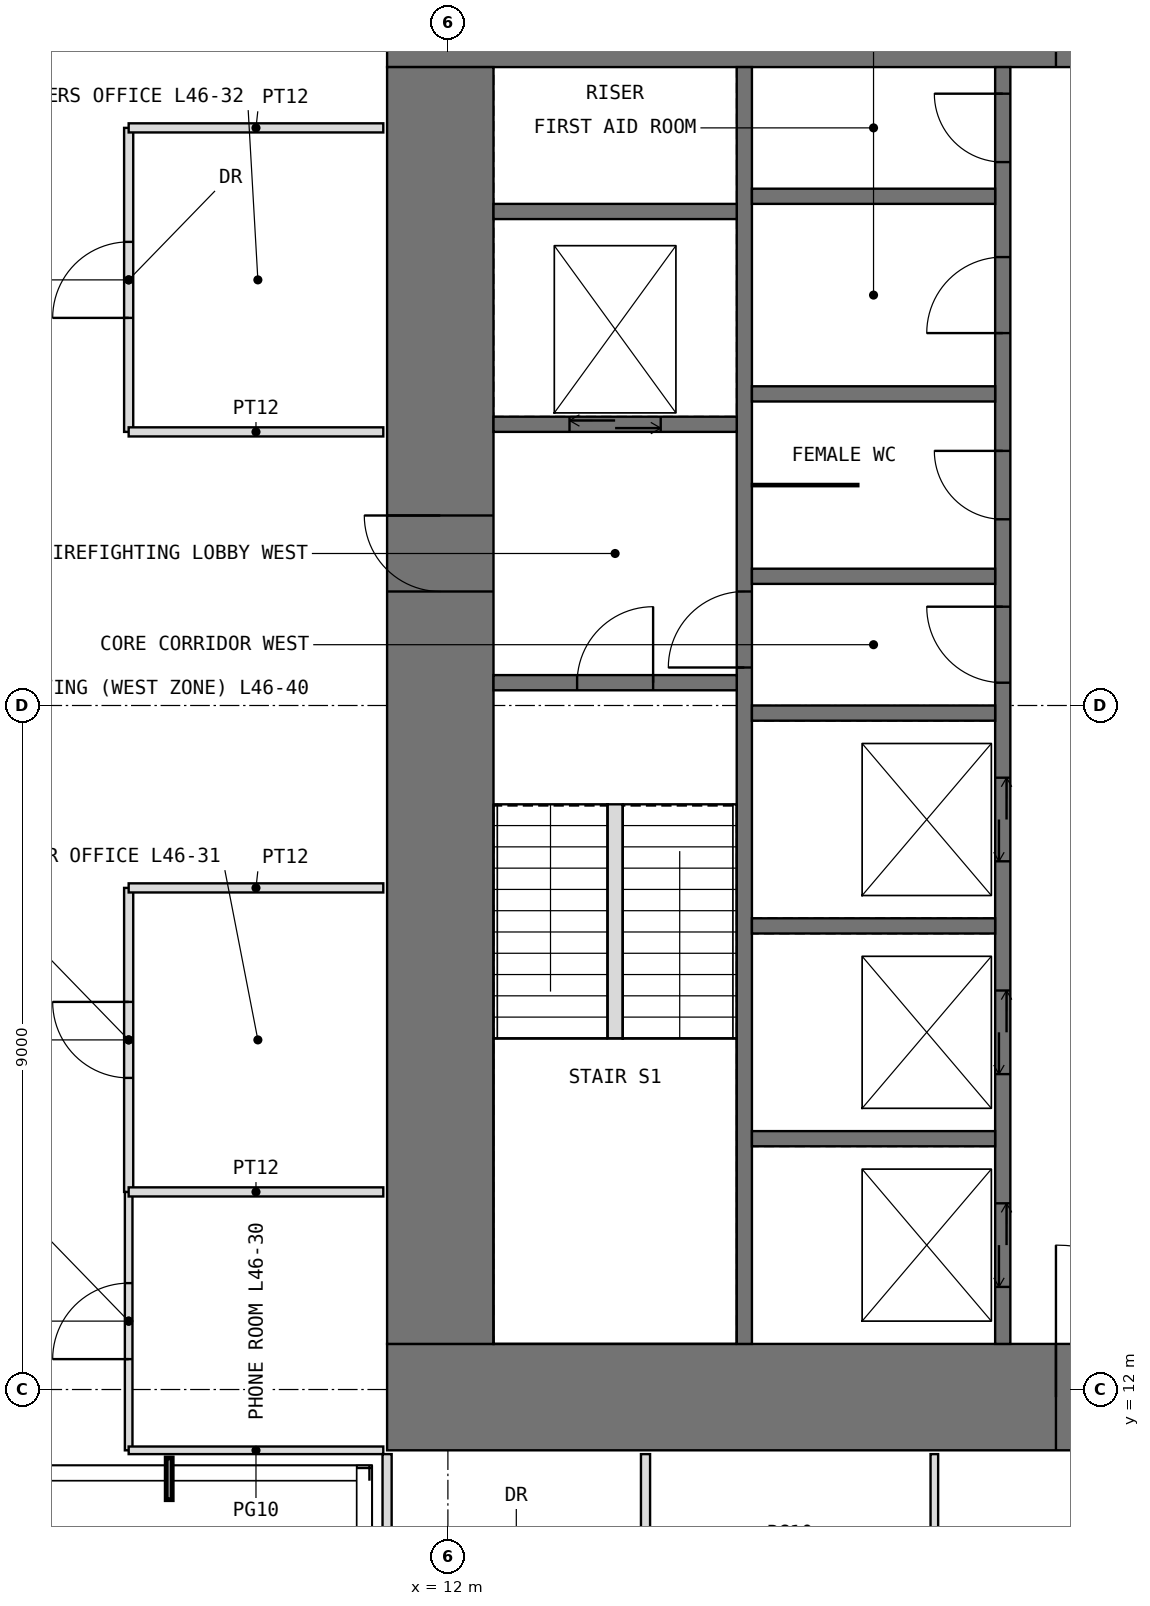
"""IFC4 building model, lengths in metres.
Left out: names, types, materials, properties, quantities, classifications, styles, units other than length and angle.
Written with IfcOpenShell. Run it as: python <this file> out.ifc"""

import sys

from ifc_helpers import new_model, si_unit, direction, frame, frame_2d, origin, place, context, subcontext, project, spatial, rectangle, extrude, element, fill, save


model = new_model("IFC4")
c1 = context("Model", 3, precision=1e-05, world=origin(), true_north=direction((0.0, 1.0)))
c2 = subcontext(c1, "Body", "Model", "MODEL_VIEW")
j1 = project(units=[si_unit("LENGTHUNIT", "METRE"), si_unit("PLANEANGLEUNIT", "RADIAN")], contexts=[c1])
p1 = place(None, origin())
s1 = spatial("IfcSite", under=j1, at=p1, CompositionType="ELEMENT")
p2 = place(p1, origin())
s2 = spatial("IfcBuilding", under=s1, at=p2, CompositionType="ELEMENT")
p3 = place(p2, frame((0.0, 0.0, 194.5)))
s3 = spatial("IfcBuildingStorey", under=s2, at=p3, CompositionType="ELEMENT", Elevation=194.5)
p4 = place(p3, frame((11.2, 11.9, -0.05), z_axis=(0.0, 0.0, 1.0), x_axis=(1.0, 0.0, 0.0)))
e1 = element("IfcWall", 1, at=p4, inside=s3, PredefinedType="SHEAR", context=c2, shape_type="SweptSolid", body=[
    extrude(rectangle(XDim=19.6, YDim=1.4, at=frame_2d((9.8, 0.0))), origin(), (0.0, 0.0, 1.0), 4.0),
])
p5 = place(p4, frame((8.8, 0.0, 0.05)))
e2 = element("IfcOpeningElement", 2, at=p5, cuts=e1, PredefinedType="OPENING", context=c2, shape_type="SweptSolid", body=[
    extrude(rectangle(XDim=2.0, YDim=2.2, at=frame_2d((1.0, 1.1))), frame((0.0, 0.71, 0.0), z_axis=(0.0, -1.0, 0.0), x_axis=(1.0, 0.0, 0.0)), (0.0, 0.0, 1.0), 1.42),
])
p6 = place(p3, frame((11.2, 30.1, -0.05), z_axis=(0.0, 0.0, 1.0), x_axis=(1.0, 0.0, 0.0)))
e3 = element("IfcWall", 3, at=p6, inside=s3, PredefinedType="SHEAR", context=c2, shape_type="SweptSolid", body=[
    extrude(rectangle(XDim=19.6, YDim=1.4, at=frame_2d((9.8, 0.0))), origin(), (0.0, 0.0, 1.0), 4.0),
])
p7 = place(p6, frame((8.8, 0.0, 0.05)))
e4 = element("IfcOpeningElement", 4, at=p7, cuts=e3, PredefinedType="OPENING", context=c2, shape_type="SweptSolid", body=[
    extrude(rectangle(XDim=2.0, YDim=2.2, at=frame_2d((1.0, 1.1))), frame((0.0, 0.71, 0.0), z_axis=(0.0, -1.0, 0.0), x_axis=(1.0, 0.0, 0.0)), (0.0, 0.0, 1.0), 1.42),
])
p8 = place(p3, frame((11.9, 12.6, -0.05), z_axis=(0.0, 0.0, 1.0), x_axis=(0.0, 1.0, 0.0)))
e5 = element("IfcWall", 5, at=p8, inside=s3, PredefinedType="SHEAR", context=c2, shape_type="SweptSolid", body=[
    extrude(rectangle(XDim=16.8, YDim=1.4, at=frame_2d((8.4, 0.0))), origin(), (0.0, 0.0, 1.0), 4.0),
])
p9 = place(p8, frame((9.9, 0.0, 0.05)))
e6 = element("IfcOpeningElement", 6, at=p9, cuts=e5, PredefinedType="OPENING", context=c2, shape_type="SweptSolid", body=[
    extrude(rectangle(XDim=1.0, YDim=2.2, at=frame_2d((0.5, 1.1))), frame((0.0, 0.71, 0.0), z_axis=(0.0, -1.0, 0.0), x_axis=(1.0, 0.0, 0.0)), (0.0, 0.0, 1.0), 1.42),
])
p10 = place(p3, frame((15.9, 12.6, -0.05), z_axis=(0.0, 0.0, 1.0), x_axis=(0.0, 1.0, 0.0)))
e7 = element("IfcWall", 7, at=p10, inside=s3, PredefinedType="SHEAR", context=c2, shape_type="SweptSolid", body=[
    extrude(rectangle(XDim=16.8, YDim=0.2, at=frame_2d((8.4, 0.0))), origin(), (0.0, 0.0, 1.0), 4.0),
])
p11 = place(p10, frame((8.9, 0.0, 0.05)))
e8 = element("IfcOpeningElement", 8, at=p11, cuts=e7, PredefinedType="OPENING", context=c2, shape_type="SweptSolid", body=[
    extrude(rectangle(XDim=1.0, YDim=2.2, at=frame_2d((0.5, 1.1))), frame((0.0, 0.11, 0.0), z_axis=(0.0, -1.0, 0.0), x_axis=(1.0, 0.0, 0.0)), (0.0, 0.0, 1.0), 0.22),
])
p12 = place(p3, frame((19.3, 12.6, -0.05), z_axis=(0.0, 0.0, 1.0), x_axis=(0.0, 1.0, 0.0)))
e9 = element("IfcWall", 9, at=p12, inside=s3, PredefinedType="SHEAR", context=c2, shape_type="SweptSolid", body=[
    extrude(rectangle(XDim=16.8, YDim=0.2, at=frame_2d((8.4, 0.0))), origin(), (0.0, 0.0, 1.0), 4.0),
])
p13 = place(p12, frame((8.7, 0.0, 0.05)))
e10 = element("IfcOpeningElement", 10, at=p13, cuts=e9, PredefinedType="OPENING", context=c2, shape_type="SweptSolid", body=[
    extrude(rectangle(XDim=1.0, YDim=2.2, at=frame_2d((0.5, 1.1))), frame((0.0, 0.11, 0.0), z_axis=(0.0, -1.0, 0.0), x_axis=(1.0, 0.0, 0.0)), (0.0, 0.0, 1.0), 0.22),
])
p14 = place(p12, frame((10.85, 0.0, 0.05)))
e11 = element("IfcOpeningElement", 11, at=p14, cuts=e9, PredefinedType="OPENING", context=c2, shape_type="SweptSolid", body=[
    extrude(rectangle(XDim=0.9, YDim=2.2, at=frame_2d((0.45, 1.1))), frame((0.0, 0.11, 0.0), z_axis=(0.0, -1.0, 0.0), x_axis=(1.0, 0.0, 0.0)), (0.0, 0.0, 1.0), 0.22),
])
p15 = place(p12, frame((13.3, 0.0, 0.05)))
e12 = element("IfcOpeningElement", 12, at=p15, cuts=e9, PredefinedType="OPENING", context=c2, shape_type="SweptSolid", body=[
    extrude(rectangle(XDim=1.0, YDim=2.2, at=frame_2d((0.5, 1.1))), frame((0.0, 0.11, 0.0), z_axis=(0.0, -1.0, 0.0), x_axis=(1.0, 0.0, 0.0)), (0.0, 0.0, 1.0), 0.22),
])
p16 = place(p12, frame((15.55, 0.0, 0.05)))
e13 = element("IfcOpeningElement", 13, at=p16, cuts=e9, PredefinedType="OPENING", context=c2, shape_type="SweptSolid", body=[
    extrude(rectangle(XDim=0.9, YDim=2.2, at=frame_2d((0.45, 1.1))), frame((0.0, 0.11, 0.0), z_axis=(0.0, -1.0, 0.0), x_axis=(1.0, 0.0, 0.0)), (0.0, 0.0, 1.0), 0.22),
])
p17 = place(p12, frame((0.75, 0.0, 0.05)))
e14 = element("IfcOpeningElement", 14, at=p17, cuts=e9, PredefinedType="OPENING", context=c2, shape_type="SweptSolid", body=[
    extrude(rectangle(XDim=1.1, YDim=2.2, at=frame_2d((0.55, 1.1))), frame((0.0, 0.11, 0.0), z_axis=(0.0, -1.0, 0.0), x_axis=(1.0, 0.0, 0.0)), (0.0, 0.0, 1.0), 0.22),
])
p18 = place(p12, frame((3.55, 0.0, 0.05)))
e15 = element("IfcOpeningElement", 15, at=p18, cuts=e9, PredefinedType="OPENING", context=c2, shape_type="SweptSolid", body=[
    extrude(rectangle(XDim=1.1, YDim=2.2, at=frame_2d((0.55, 1.1))), frame((0.0, 0.11, 0.0), z_axis=(0.0, -1.0, 0.0), x_axis=(1.0, 0.0, 0.0)), (0.0, 0.0, 1.0), 0.22),
])
p19 = place(p12, frame((6.35, 0.0, 0.05)))
e16 = element("IfcOpeningElement", 16, at=p19, cuts=e9, PredefinedType="OPENING", context=c2, shape_type="SweptSolid", body=[
    extrude(rectangle(XDim=1.1, YDim=2.2, at=frame_2d((0.55, 1.1))), frame((0.0, 0.11, 0.0), z_axis=(0.0, -1.0, 0.0), x_axis=(1.0, 0.0, 0.0)), (0.0, 0.0, 1.0), 0.22),
])
p20 = place(p3, frame((12.6, 21.3, -0.05), z_axis=(0.0, 0.0, 1.0), x_axis=(1.0, 0.0, 0.0)))
e17 = element("IfcWall", 17, at=p20, inside=s3, PredefinedType="SHEAR", context=c2, shape_type="SweptSolid", body=[
    extrude(rectangle(XDim=3.2, YDim=0.2, at=frame_2d((1.6, 0.0))), origin(), (0.0, 0.0, 1.0), 4.0),
])
p21 = place(p20, frame((1.1, 0.0, 0.05)))
e18 = element("IfcOpeningElement", 18, at=p21, cuts=e17, PredefinedType="OPENING", context=c2, shape_type="SweptSolid", body=[
    extrude(rectangle(XDim=1.0, YDim=2.2, at=frame_2d((0.5, 1.1))), frame((0.0, 0.11, 0.0), z_axis=(0.0, -1.0, 0.0), x_axis=(1.0, 0.0, 0.0)), (0.0, 0.0, 1.0), 0.22),
])
p22 = place(p3, frame((12.6, 24.7, -0.05), z_axis=(0.0, 0.0, 1.0), x_axis=(1.0, 0.0, 0.0)))
e19 = element("IfcWall", 19, at=p22, inside=s3, PredefinedType="SHEAR", context=c2, shape_type="SweptSolid", body=[
    extrude(rectangle(XDim=3.2, YDim=0.2, at=frame_2d((1.6, 0.0))), origin(), (0.0, 0.0, 1.0), 4.0),
])
p23 = place(p22, frame((1.0, 0.0, 0.05)))
e20 = element("IfcOpeningElement", 20, at=p23, cuts=e19, PredefinedType="OPENING", context=c2, shape_type="SweptSolid", body=[
    extrude(rectangle(XDim=1.2, YDim=2.2, at=frame_2d((0.6, 1.1))), frame((0.0, 0.11, 0.0), z_axis=(0.0, -1.0, 0.0), x_axis=(1.0, 0.0, 0.0)), (0.0, 0.0, 1.0), 0.22),
])
for number, where, z_axis, x_axis in (
    (21, (12.6, 27.5, -0.05), (0.0, 0.0, 1.0), (1.0, 0.0, 0.0)),
    (22, (16.0, 15.3, -0.05), (0.0, 0.0, 1.0), (1.0, 0.0, 0.0)),
    (23, (16.0, 18.1, -0.05), (0.0, 0.0, 1.0), (1.0, 0.0, 0.0)),
    (24, (16.0, 20.9, -0.05), (0.0, 0.0, 1.0), (1.0, 0.0, 0.0)),
    (25, (16.0, 22.7, -0.05), (0.0, 0.0, 1.0), (1.0, 0.0, 0.0)),
    (26, (16.0, 25.1, -0.05), (0.0, 0.0, 1.0), (1.0, 0.0, 0.0)),
    (27, (16.0, 27.7, -0.05), (0.0, 0.0, 1.0), (1.0, 0.0, 0.0)),
):
    element("IfcWall", number, at=place(p3, frame(where, z_axis=z_axis, x_axis=x_axis)), inside=s3, PredefinedType="SHEAR", context=c2, shape_type="SweptSolid", body=[
        extrude(rectangle(XDim=3.2, YDim=0.2, at=frame_2d((1.6, 0.0))), origin(), (0.0, 0.0, 1.0), 4.0),
    ])
p24 = place(p3, frame((16.0, 23.9, 0.0), z_axis=(0.0, 0.0, 1.0), x_axis=(1.0, 0.0, 0.0)))
e28 = element("IfcWall", 28, at=p24, inside=s3, PredefinedType="PARTITIONING", context=c2, shape_type="SweptSolid", body=[
    extrude(rectangle(XDim=1.4, YDim=0.03, at=frame_2d((0.7, 0.0))), origin(), (0.0, 0.0, 1.0), 3.75),
])
p25 = place(p3, frame((7.8, 11.2, 0.0), z_axis=(0.0, 0.0, 1.0), x_axis=(0.0, 1.0, 0.0)))
e29 = element("IfcWall", 29, at=p25, inside=s3, PredefinedType="PARTITIONING", context=c2, shape_type="SweptSolid", body=[
    extrude(rectangle(XDim=3.4, YDim=0.1, at=frame_2d((1.7, 0.0))), origin(), (0.0, 0.0, 1.0), 3.75),
])
p26 = place(p25, frame((1.2, 0.0, 0.0)))
e30 = element("IfcOpeningElement", 30, at=p26, cuts=e29, PredefinedType="OPENING", context=c2, shape_type="SweptSolid", body=[
    extrude(rectangle(XDim=1.0, YDim=2.4, at=frame_2d((0.5, 1.2))), frame((0.0, 0.06, 0.0), z_axis=(0.0, -1.0, 0.0), x_axis=(1.0, 0.0, 0.0)), (0.0, 0.0, 1.0), 0.12),
])
p27 = place(p3, frame((7.8, 11.2, 0.0), z_axis=(0.0, 0.0, 1.0), x_axis=(1.0, 0.0, 0.0)))
e31 = element("IfcWall", 31, at=p27, inside=s3, PredefinedType="PARTITIONING", context=c2, shape_type="SweptSolid", body=[
    extrude(rectangle(XDim=3.35, YDim=0.1, at=frame_2d((1.675, 0.0))), origin(), (0.0, 0.0, 1.0), 3.75),
])
p28 = place(p3, frame((7.8, 14.6, 0.0), z_axis=(0.0, 0.0, 1.0), x_axis=(0.0, 1.0, 0.0)))
e32 = element("IfcWall", 32, at=p28, inside=s3, PredefinedType="PARTITIONING", context=c2, shape_type="SweptSolid", body=[
    extrude(rectangle(XDim=4.0, YDim=0.12, at=frame_2d((2.0, 0.0))), origin(), (0.0, 0.0, 1.0), 3.75),
])
p29 = place(p28, frame((1.5, 0.0, 0.0)))
e33 = element("IfcOpeningElement", 33, at=p29, cuts=e32, PredefinedType="OPENING", context=c2, shape_type="SweptSolid", body=[
    extrude(rectangle(XDim=1.0, YDim=2.2, at=frame_2d((0.5, 1.1))), frame((0.0, 0.07, 0.0), z_axis=(0.0, -1.0, 0.0), x_axis=(1.0, 0.0, 0.0)), (0.0, 0.0, 1.0), 0.14),
])
for number, where, z_axis, x_axis in (
    (34, (7.8, 14.6, 0.0), (0.0, 0.0, 1.0), (1.0, 0.0, 0.0)),
    (35, (7.8, 18.6, 0.0), (0.0, 0.0, 1.0), (1.0, 0.0, 0.0)),
):
    element("IfcWall", number, at=place(p3, frame(where, z_axis=z_axis, x_axis=x_axis)), inside=s3, PredefinedType="PARTITIONING", context=c2, shape_type="SweptSolid", body=[
        extrude(rectangle(XDim=3.35, YDim=0.12, at=frame_2d((1.675, 0.0))), origin(), (0.0, 0.0, 1.0), 3.75),
    ])
p30 = place(p3, frame((7.8, 24.6, 0.0), z_axis=(0.0, 0.0, 1.0), x_axis=(0.0, 1.0, 0.0)))
e36 = element("IfcWall", 36, at=p30, inside=s3, PredefinedType="PARTITIONING", context=c2, shape_type="SweptSolid", body=[
    extrude(rectangle(XDim=4.0, YDim=0.12, at=frame_2d((2.0, 0.0))), origin(), (0.0, 0.0, 1.0), 3.75),
])
p31 = place(p30, frame((1.5, 0.0, 0.0)))
e37 = element("IfcOpeningElement", 37, at=p31, cuts=e36, PredefinedType="OPENING", context=c2, shape_type="SweptSolid", body=[
    extrude(rectangle(XDim=1.0, YDim=2.2, at=frame_2d((0.5, 1.1))), frame((0.0, 0.07, 0.0), z_axis=(0.0, -1.0, 0.0), x_axis=(1.0, 0.0, 0.0)), (0.0, 0.0, 1.0), 0.14),
])
for number, where, z_axis, x_axis in (
    (38, (7.8, 24.6, 0.0), (0.0, 0.0, 1.0), (1.0, 0.0, 0.0)),
    (39, (7.8, 28.6, 0.0), (0.0, 0.0, 1.0), (1.0, 0.0, 0.0)),
):
    element("IfcWall", number, at=place(p3, frame(where, z_axis=z_axis, x_axis=x_axis)), inside=s3, PredefinedType="PARTITIONING", context=c2, shape_type="SweptSolid", body=[
        extrude(rectangle(XDim=3.35, YDim=0.12, at=frame_2d((1.675, 0.0))), origin(), (0.0, 0.0, 1.0), 3.75),
    ])
for number, where, z_axis, x_axis in (
    (40, (11.2, 8.7, 0.0), (0.0, 0.0, 1.0), (0.0, 1.0, 0.0)),
    (41, (14.6, 8.7, 0.0), (0.0, 0.0, 1.0), (0.0, 1.0, 0.0)),
):
    element("IfcWall", number, at=place(p3, frame(where, z_axis=z_axis, x_axis=x_axis)), inside=s3, PredefinedType="PARTITIONING", context=c2, shape_type="SweptSolid", body=[
        extrude(rectangle(XDim=2.45, YDim=0.12, at=frame_2d((1.225, 0.0))), origin(), (0.0, 0.0, 1.0), 3.75),
    ])
p32 = place(p3, frame((18.4, 8.2, 0.0), z_axis=(0.0, 0.0, 1.0), x_axis=(0.0, 1.0, 0.0)))
e42 = element("IfcWall", 42, at=p32, inside=s3, PredefinedType="PARTITIONING", context=c2, shape_type="SweptSolid", body=[
    extrude(rectangle(XDim=2.95, YDim=0.1, at=frame_2d((1.475, 0.0))), origin(), (0.0, 0.0, 1.0), 3.75),
])
p33 = place(p3, frame((14.2, 16.62, 0.0), z_axis=(0.0, 0.0, 1.0), x_axis=(0.0, 1.0, 0.0)))
e43 = element("IfcWall", 43, at=p33, inside=s3, PredefinedType="PARTITIONING", context=c2, shape_type="SweptSolid", body=[
    extrude(rectangle(XDim=3.08, YDim=0.2, at=frame_2d((1.54, 0.0))), origin(), (0.0, 0.0, 1.0), 4.0),
])
p34 = place(p5, origin())
e44 = element("IfcDoor", 44, at=p34, inside=s3, OperationType="DOUBLE_DOOR_SINGLE_SWING", PredefinedType="DOOR", context=c2, shape_type="SweptSolid", body=[
    extrude(rectangle(XDim=2.0, YDim=2.2, at=frame_2d((1.0, 1.1))), frame((0.0, 0.025, 0.0), z_axis=(0.0, -1.0, 0.0), x_axis=(1.0, 0.0, 0.0)), (0.0, 0.0, 1.0), 0.05),
])
fill(e2, e44)
p35 = place(p9, origin())
e45 = element("IfcDoor", 45, at=p35, inside=s3, OperationType="SINGLE_SWING_RIGHT", PredefinedType="DOOR", context=c2, shape_type="SweptSolid", body=[
    extrude(rectangle(XDim=1.0, YDim=2.2, at=frame_2d((0.5, 1.1))), frame((0.0, 0.025, 0.0), z_axis=(0.0, -1.0, 0.0), x_axis=(1.0, 0.0, 0.0)), (0.0, 0.0, 1.0), 0.05),
])
fill(e6, e45)
p36 = place(p21, origin())
e46 = element("IfcDoor", 46, at=p36, inside=s3, OperationType="SINGLE_SWING_RIGHT", PredefinedType="DOOR", context=c2, shape_type="SweptSolid", body=[
    extrude(rectangle(XDim=1.0, YDim=2.2, at=frame_2d((0.5, 1.1))), frame((0.0, 0.025, 0.0), z_axis=(0.0, -1.0, 0.0), x_axis=(1.0, 0.0, 0.0)), (0.0, 0.0, 1.0), 0.05),
])
fill(e18, e46)
p37 = place(p11, origin())
e47 = element("IfcDoor", 47, at=p37, inside=s3, OperationType="SINGLE_SWING_LEFT", PredefinedType="DOOR", context=c2, shape_type="SweptSolid", body=[
    extrude(rectangle(XDim=1.0, YDim=2.2, at=frame_2d((0.5, 1.1))), frame((0.0, 0.025, 0.0), z_axis=(0.0, -1.0, 0.0), x_axis=(1.0, 0.0, 0.0)), (0.0, 0.0, 1.0), 0.05),
])
fill(e8, e47)
p38 = place(p13, origin())
e48 = element("IfcDoor", 48, at=p38, inside=s3, OperationType="SINGLE_SWING_RIGHT", PredefinedType="DOOR", context=c2, shape_type="SweptSolid", body=[
    extrude(rectangle(XDim=1.0, YDim=2.2, at=frame_2d((0.5, 1.1))), frame((0.0, 0.025, 0.0), z_axis=(0.0, -1.0, 0.0), x_axis=(1.0, 0.0, 0.0)), (0.0, 0.0, 1.0), 0.05),
])
fill(e10, e48)
p39 = place(p14, origin())
e49 = element("IfcDoor", 49, at=p39, inside=s3, OperationType="SINGLE_SWING_RIGHT", PredefinedType="DOOR", context=c2, shape_type="SweptSolid", body=[
    extrude(rectangle(XDim=0.9, YDim=2.2, at=frame_2d((0.45, 1.1))), frame((0.0, 0.025, 0.0), z_axis=(0.0, -1.0, 0.0), x_axis=(1.0, 0.0, 0.0)), (0.0, 0.0, 1.0), 0.05),
])
fill(e11, e49)
p40 = place(p15, origin())
e50 = element("IfcDoor", 50, at=p40, inside=s3, OperationType="SINGLE_SWING_LEFT", PredefinedType="DOOR", context=c2, shape_type="SweptSolid", body=[
    extrude(rectangle(XDim=1.0, YDim=2.2, at=frame_2d((0.5, 1.1))), frame((0.0, 0.025, 0.0), z_axis=(0.0, -1.0, 0.0), x_axis=(1.0, 0.0, 0.0)), (0.0, 0.0, 1.0), 0.05),
])
fill(e12, e50)
p41 = place(p16, origin())
e51 = element("IfcDoor", 51, at=p41, inside=s3, OperationType="SINGLE_SWING_RIGHT", PredefinedType="DOOR", context=c2, shape_type="SweptSolid", body=[
    extrude(rectangle(XDim=0.9, YDim=2.2, at=frame_2d((0.45, 1.1))), frame((0.0, 0.025, 0.0), z_axis=(0.0, -1.0, 0.0), x_axis=(1.0, 0.0, 0.0)), (0.0, 0.0, 1.0), 0.05),
])
fill(e13, e51)
p42 = place(p26, origin())
e52 = element("IfcDoor", 52, at=p42, inside=s3, OperationType="SINGLE_SWING_LEFT", PredefinedType="DOOR", context=c2, shape_type="SweptSolid", body=[
    extrude(rectangle(XDim=1.0, YDim=2.4, at=frame_2d((0.5, 1.2))), frame((0.0, 0.025, 0.0), z_axis=(0.0, -1.0, 0.0), x_axis=(1.0, 0.0, 0.0)), (0.0, 0.0, 1.0), 0.05),
])
fill(e30, e52)
p43 = place(p29, origin())
e53 = element("IfcDoor", 53, at=p43, inside=s3, OperationType="SINGLE_SWING_RIGHT", PredefinedType="DOOR", context=c2, shape_type="SweptSolid", body=[
    extrude(rectangle(XDim=1.0, YDim=2.2, at=frame_2d((0.5, 1.1))), frame((0.0, 0.025, 0.0), z_axis=(0.0, -1.0, 0.0), x_axis=(1.0, 0.0, 0.0)), (0.0, 0.0, 1.0), 0.05),
])
fill(e33, e53)
p44 = place(p31, origin())
e54 = element("IfcDoor", 54, at=p44, inside=s3, OperationType="SINGLE_SWING_LEFT", PredefinedType="DOOR", context=c2, shape_type="SweptSolid", body=[
    extrude(rectangle(XDim=1.0, YDim=2.2, at=frame_2d((0.5, 1.1))), frame((0.0, 0.025, 0.0), z_axis=(0.0, -1.0, 0.0), x_axis=(1.0, 0.0, 0.0)), (0.0, 0.0, 1.0), 0.05),
])
fill(e37, e54)
p45 = place(p17, origin())
e55 = element("IfcDoor", 55, at=p45, inside=s3, OperationType="DOUBLE_DOOR_SLIDING", PredefinedType="DOOR", context=c2, shape_type="SweptSolid", body=[
    extrude(rectangle(XDim=1.1, YDim=2.2, at=frame_2d((0.55, 1.1))), frame((0.0, 0.025, 0.0), z_axis=(0.0, -1.0, 0.0), x_axis=(1.0, 0.0, 0.0)), (0.0, 0.0, 1.0), 0.05),
])
fill(e14, e55)
p46 = place(p18, origin())
e56 = element("IfcDoor", 56, at=p46, inside=s3, OperationType="DOUBLE_DOOR_SLIDING", PredefinedType="DOOR", context=c2, shape_type="SweptSolid", body=[
    extrude(rectangle(XDim=1.1, YDim=2.2, at=frame_2d((0.55, 1.1))), frame((0.0, 0.025, 0.0), z_axis=(0.0, -1.0, 0.0), x_axis=(1.0, 0.0, 0.0)), (0.0, 0.0, 1.0), 0.05),
])
fill(e15, e56)
p47 = place(p19, origin())
e57 = element("IfcDoor", 57, at=p47, inside=s3, OperationType="DOUBLE_DOOR_SLIDING", PredefinedType="DOOR", context=c2, shape_type="SweptSolid", body=[
    extrude(rectangle(XDim=1.1, YDim=2.2, at=frame_2d((0.55, 1.1))), frame((0.0, 0.025, 0.0), z_axis=(0.0, -1.0, 0.0), x_axis=(1.0, 0.0, 0.0)), (0.0, 0.0, 1.0), 0.05),
])
fill(e16, e57)
p48 = place(p23, origin())
e58 = element("IfcDoor", 58, at=p48, inside=s3, OperationType="DOUBLE_DOOR_SLIDING", PredefinedType="DOOR", context=c2, shape_type="SweptSolid", body=[
    extrude(rectangle(XDim=1.2, YDim=2.2, at=frame_2d((0.6, 1.1))), frame((0.0, 0.025, 0.0), z_axis=(0.0, -1.0, 0.0), x_axis=(1.0, 0.0, 0.0)), (0.0, 0.0, 1.0), 0.05),
])
fill(e20, e58)
save(model, sys.argv[1])
